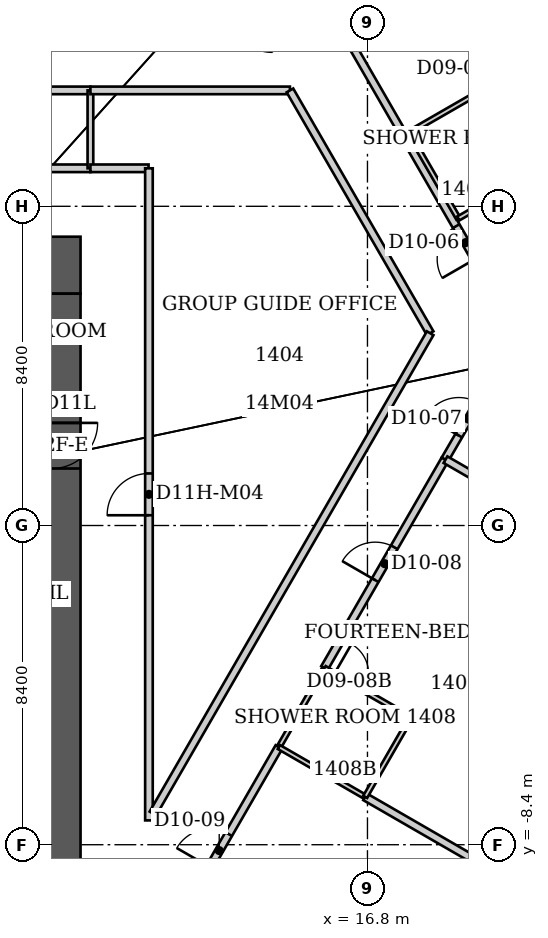
"""IFC4 building model, lengths in metres.
Left out: names, types, materials, properties, quantities, classifications, styles, units other than length and angle.
Written with IfcOpenShell. Run it as: python <this file> out.ifc"""

import sys

from ifc_helpers import new_model, si_unit, direction, frame, frame_2d, origin, origin_2d, place, context, subcontext, project, spatial, rectangle, extrude, element, fill, save


model = new_model("IFC4")
c1 = context("Model", 3, precision=1e-05, world=origin(), true_north=direction((0.0, 1.0)))
c2 = subcontext(c1, "Body", "Model", "MODEL_VIEW")
j1 = project(units=[si_unit("LENGTHUNIT", "METRE"), si_unit("PLANEANGLEUNIT", "RADIAN")], contexts=[c1])
p1 = place(None, origin())
s1 = spatial("IfcSite", under=j1, at=p1, CompositionType="ELEMENT")
p2 = place(p1, origin())
s2 = spatial("IfcBuilding", under=s1, at=p2, CompositionType="ELEMENT")
p3 = place(p2, frame((0.0, 0.0, 61.0)))
s3 = spatial("IfcBuildingStorey", under=s2, at=p3, CompositionType="ELEMENT", Elevation=61.0)
p4 = place(p3, frame((20.573, -9.462, 0.0), z_axis=(-0.033513958168, 0.015408716399, 0.999319461467), x_axis=(0.865447927191, -0.499650776395, 0.03672855794)))
e1 = element("IfcColumn", 1, at=p4, inside=s3, PredefinedType="COLUMN", context=c2, shape_type="SweptSolid", body=[
    extrude(rectangle(XDim=2.4, YDim=2.4, at=origin_2d()), origin(), (0.0, 0.0, 1.0), 3.803),
])
p5 = place(p3, frame((-9.25, 6.85, 0.0), z_axis=(0.0, 0.0, 1.0), x_axis=(1.0, 0.0, 0.0)))
e2 = element("IfcWall", 2, at=p5, inside=s3, PredefinedType="SHEAR", context=c2, shape_type="SweptSolid", body=[
    extrude(rectangle(XDim=18.5, YDim=1.5, at=frame_2d((9.25, 0.0))), origin(), (0.0, 0.0, 1.0), 3.8),
])
p6 = place(p3, frame((8.5, -9.2, 0.0), z_axis=(0.0, 0.0, 1.0), x_axis=(0.0, 1.0, 0.0)))
e3 = element("IfcWall", 3, at=p6, inside=s3, PredefinedType="SHEAR", context=c2, shape_type="SweptSolid", body=[
    extrude(rectangle(XDim=15.3, YDim=1.5, at=frame_2d((7.65, 0.0))), origin(), (0.0, 0.0, 1.0), 3.8),
])
p7 = place(p6, frame((10.7, 0.0, 0.0)))
e4 = element("IfcOpeningElement", 4, at=p7, cuts=e3, PredefinedType="OPENING", context=c2, shape_type="SweptSolid", body=[
    extrude(rectangle(XDim=1.2, YDim=2.2, at=frame_2d((0.6, 1.1))), frame((0.0, 0.75, 0.0), z_axis=(0.0, -1.0, 0.0), x_axis=(1.0, 0.0, 0.0)), (0.0, 0.0, 1.0), 1.5),
])
p8 = place(p3, frame((0.58, 11.45, 0.0), z_axis=(0.0, 0.0, 1.0), x_axis=(1.0, 0.0, 0.0)))
e5 = element("IfcWall", 5, at=p8, inside=s3, PredefinedType="PARTITIONING", context=c2, shape_type="SweptSolid", body=[
    extrude(rectangle(XDim=8.93, YDim=0.2, at=frame_2d((4.465, 0.0))), origin(), (0.0, 0.0, 1.0), 3.64),
])
p9 = place(p8, frame((3.915, 0.0, 0.0)))
e6 = element("IfcOpeningElement", 6, at=p9, cuts=e5, PredefinedType="OPENING", context=c2, shape_type="SweptSolid", body=[
    extrude(rectangle(XDim=1.1, YDim=2.2, at=frame_2d((0.55, 1.1))), frame((0.0, 0.1, 0.0), z_axis=(0.0, -1.0, 0.0), x_axis=(1.0, 0.0, 0.0)), (0.0, 0.0, 1.0), 0.2),
])
p10 = place(p3, frame((9.51, 9.4, 0.0), z_axis=(0.0, 0.0, 1.0), x_axis=(-1.0, 0.0, 0.0)))
e7 = element("IfcWall", 7, at=p10, inside=s3, PredefinedType="PARTITIONING", context=c2, shape_type="SweptSolid", body=[
    extrude(rectangle(XDim=8.93, YDim=0.2, at=frame_2d((4.465, 0.0))), origin(), (0.0, 0.0, 1.0), 3.64),
])
p11 = place(p3, frame((9.51, 11.45, 0.0), z_axis=(0.0, 0.0, 1.0), x_axis=(0.0, -1.0, 0.0)))
e8 = element("IfcWall", 8, at=p11, inside=s3, PredefinedType="PARTITIONING", context=c2, shape_type="SweptSolid", body=[
    extrude(rectangle(XDim=2.05, YDim=0.15, at=frame_2d((1.025, 0.0))), origin(), (0.0, 0.0, 1.0), 3.64),
])
p12 = place(p3, frame((9.51, 11.45, 0.0), z_axis=(0.0, 0.0, 1.0), x_axis=(1.0, 0.0, 0.0)))
e9 = element("IfcWall", 9, at=p12, inside=s3, PredefinedType="PARTITIONING", context=c2, shape_type="SweptSolid", body=[
    extrude(rectangle(XDim=5.25, YDim=0.2, at=frame_2d((2.625, 0.0))), origin(), (0.0, 0.0, 1.0), 3.64),
])
p13 = place(p3, frame((11.04, 9.4, 0.0), z_axis=(0.0, 0.0, 1.0), x_axis=(-1.0, 0.0, 0.0)))
e10 = element("IfcWall", 10, at=p13, inside=s3, PredefinedType="PARTITIONING", context=c2, shape_type="SweptSolid", body=[
    extrude(rectangle(XDim=1.53, YDim=0.2, at=frame_2d((0.765, 0.0))), origin(), (0.0, 0.0, 1.0), 3.64),
])
p14 = place(p3, frame((11.05, -7.76, 0.0), z_axis=(0.0, 0.0, 1.0), x_axis=(0.0, 1.0, 0.0)))
e11 = element("IfcWall", 11, at=p14, inside=s3, PredefinedType="PARTITIONING", context=c2, shape_type="SweptSolid", body=[
    extrude(rectangle(XDim=17.16, YDim=0.2, at=frame_2d((8.58, 0.0))), origin(), (0.0, 0.0, 1.0), 3.64),
])
p15 = place(p14, frame((8.03, 0.0, 0.0)))
e12 = element("IfcOpeningElement", 12, at=p15, cuts=e11, PredefinedType="OPENING", context=c2, shape_type="SweptSolid", body=[
    extrude(rectangle(XDim=1.1, YDim=2.2, at=frame_2d((0.55, 1.1))), frame((0.0, 0.1, 0.0), z_axis=(0.0, -1.0, 0.0), x_axis=(1.0, 0.0, 0.0)), (0.0, 0.0, 1.0), 0.2),
])
p16 = place(p3, frame((11.328, -11.279, 0.0), z_axis=(0.0, 0.0, 1.0), x_axis=(0.499554430625, 0.866282500598, 0.0)))
e13 = element("IfcWall", 13, at=p16, inside=s3, PredefinedType="PARTITIONING", context=c2, shape_type="SweptSolid", body=[
    extrude(rectangle(XDim=6.29, YDim=0.2, at=frame_2d((3.145, 0.0))), origin(), (0.0, 0.0, 1.0), 3.64),
])
p17 = place(p16, frame((2.645, 0.0, 0.0)))
e14 = element("IfcOpeningElement", 14, at=p17, cuts=e13, PredefinedType="OPENING", context=c2, shape_type="SweptSolid", body=[
    extrude(rectangle(XDim=1.0, YDim=2.13, at=frame_2d((0.5, 1.065))), frame((0.0, 0.1, 0.0), z_axis=(0.0, -1.0, 0.0), x_axis=(1.0, 0.0, 0.0)), (0.0, 0.0, 1.0), 0.2),
])
p18 = place(p3, frame((14.47, -5.83, 0.0), z_axis=(0.0, 0.0, 1.0), x_axis=(0.499693115345, 0.866202511239, 0.0)))
e15 = element("IfcWall", 15, at=p18, inside=s3, PredefinedType="PARTITIONING", context=c2, shape_type="SweptSolid", body=[
    extrude(rectangle(XDim=2.401, YDim=0.12, at=frame_2d((1.201, 0.0))), origin(), (0.0, 0.0, 1.0), 3.64),
])
p19 = place(p3, frame((14.47, -5.83, 0.0), z_axis=(0.0, 0.0, 1.0), x_axis=(0.866010296064, -0.500026166427, 0.0)))
e16 = element("IfcWall", 16, at=p19, inside=s3, PredefinedType="PARTITIONING", context=c2, shape_type="SweptSolid", body=[
    extrude(rectangle(XDim=2.621, YDim=0.12, at=frame_2d((1.311, 0.0))), origin(), (0.0, 0.0, 1.0), 3.023),
])
p20 = place(p3, frame((14.76, 11.45, 0.0), z_axis=(0.0, 0.0, 1.0), x_axis=(0.500074726567, -0.865982256082, 0.0)))
e17 = element("IfcWall", 17, at=p20, inside=s3, PredefinedType="PARTITIONING", context=c2, shape_type="SweptSolid", body=[
    extrude(rectangle(XDim=7.379, YDim=0.2, at=frame_2d((3.689, 0.0))), origin(), (0.0, 0.0, 1.0), 3.64),
])
p21 = place(p3, frame((15.67, -3.75, 0.0), z_axis=(0.0, 0.0, 1.0), x_axis=(0.500061360627, 0.865989974311, 0.0)))
e18 = element("IfcWall", 18, at=p21, inside=s3, PredefinedType="PARTITIONING", context=c2, shape_type="SweptSolid", body=[
    extrude(rectangle(XDim=6.34, YDim=0.2, at=frame_2d((3.17, 0.0))), origin(), (0.0, 0.0, 1.0), 3.64),
])
p22 = place(p21, frame((2.67, 0.0, 0.0)))
e19 = element("IfcOpeningElement", 19, at=p22, cuts=e18, PredefinedType="OPENING", context=c2, shape_type="SweptSolid", body=[
    extrude(rectangle(XDim=1.0, YDim=2.13, at=frame_2d((0.5, 1.065))), frame((0.0, 0.1, 0.0), z_axis=(0.0, -1.0, 0.0), x_axis=(1.0, 0.0, 0.0)), (0.0, 0.0, 1.0), 0.2),
])
p23 = place(p3, frame((15.92, 13.45, 0.0), z_axis=(0.0, 0.0, 1.0), x_axis=(0.499668886391, -0.866216487937, 0.0)))
e20 = element("IfcWall", 20, at=p23, inside=s3, PredefinedType="PARTITIONING", context=c2, shape_type="SweptSolid", body=[
    extrude(rectangle(XDim=3.683, YDim=0.2, at=frame_2d((1.841, 0.0))), origin(), (0.0, 0.0, 1.0), 3.64),
])
p24 = place(p3, frame((16.74, -7.141, 0.0), z_axis=(0.0, 0.0, 1.0), x_axis=(0.865985044037, -0.500069898618, 0.0)))
e21 = element("IfcWall", 21, at=p24, inside=s3, PredefinedType="PARTITIONING", context=c2, shape_type="SweptSolid", body=[
    extrude(rectangle(XDim=5.758, YDim=0.2, at=frame_2d((2.879, 0.0))), origin(), (0.0, 0.0, 1.0), 3.023),
])
p25 = place(p3, frame((16.74, -7.14, 0.0), z_axis=(0.0, 0.0, 1.0), x_axis=(0.499737123639, 0.866177122335, 0.0)))
e22 = element("IfcWall", 22, at=p25, inside=s3, PredefinedType="PARTITIONING", context=c2, shape_type="SweptSolid", body=[
    extrude(rectangle(XDim=2.401, YDim=0.12, at=frame_2d((1.201, 0.0))), origin(), (0.0, 0.0, 1.0), 3.64),
])
p26 = place(p3, frame((17.76, 10.26, 0.0), z_axis=(0.0, 0.0, 1.0), x_axis=(0.499725974117, -0.866183554908, 0.0)))
e23 = element("IfcWall", 23, at=p26, inside=s3, PredefinedType="PARTITIONING", context=c2, shape_type="SweptSolid", body=[
    extrude(rectangle(XDim=6.003, YDim=0.2, at=frame_2d((3.001, 0.0))), origin(), (0.0, 0.0, 1.0), 3.64),
])
p27 = place(p26, frame((2.75, 0.0, 0.0)))
e24 = element("IfcOpeningElement", 24, at=p27, cuts=e23, PredefinedType="OPENING", context=c2, shape_type="SweptSolid", body=[
    extrude(rectangle(XDim=1.0, YDim=2.13, at=frame_2d((0.5, 1.065))), frame((0.0, 0.1, 0.0), z_axis=(0.0, -1.0, 0.0), x_axis=(1.0, 0.0, 0.0)), (0.0, 0.0, 1.0), 0.2),
])
p28 = place(p3, frame((17.773, 10.268, 0.0), z_axis=(0.0, 0.0, 1.0), x_axis=(0.867562218799, 0.497328660458, 0.0)))
e25 = element("IfcWall", 25, at=p28, inside=s3, PredefinedType="PARTITIONING", context=c2, shape_type="SweptSolid", body=[
    extrude(rectangle(XDim=0.133, YDim=0.2, at=frame_2d((0.066, 0.0))), origin(), (0.0, 0.0, 1.0), 3.64),
])
p29 = place(p3, frame((17.888, 10.333, 0.0), z_axis=(0.0, 0.0, 1.0), x_axis=(0.866473201492, 0.499223588281, 0.0)))
e26 = element("IfcWall", 26, at=p29, inside=s3, PredefinedType="PARTITIONING", context=c2, shape_type="SweptSolid", body=[
    extrude(rectangle(XDim=2.401, YDim=0.12, at=frame_2d((1.201, 0.0))), origin(), (0.0, 0.0, 1.0), 2.86),
])
p30 = place(p3, frame((17.89, 10.33, 0.0), z_axis=(0.0, 0.0, 1.0), x_axis=(0.500291685314, -0.865856933682, 0.0)))
e27 = element("IfcWall", 27, at=p30, inside=s3, PredefinedType="PARTITIONING", context=c2, shape_type="SweptSolid", body=[
    extrude(rectangle(XDim=2.599, YDim=0.12, at=frame_2d((1.299, 0.0))), origin(), (0.0, 0.0, 1.0), 3.64),
])
p31 = place(p3, frame((17.94, -5.06, 0.0), z_axis=(0.0, 0.0, 1.0), x_axis=(-0.866114241029, 0.499846097802, 0.0)))
e28 = element("IfcWall", 28, at=p31, inside=s3, PredefinedType="PARTITIONING", context=c2, shape_type="SweptSolid", body=[
    extrude(rectangle(XDim=2.621, YDim=0.12, at=frame_2d((1.311, 0.0))), origin(), (0.0, 0.0, 1.0), 3.64),
])
p32 = place(p31, frame((1.421, 0.0, 0.0)))
e29 = element("IfcOpeningElement", 29, at=p32, cuts=e28, PredefinedType="OPENING", context=c2, shape_type="SweptSolid", body=[
    extrude(rectangle(XDim=0.9, YDim=2.03, at=frame_2d((0.45, 1.015))), frame((0.0, 0.06, 0.0), z_axis=(0.0, -1.0, 0.0), x_axis=(1.0, 0.0, 0.0)), (0.0, 0.0, 1.0), 0.12),
])
p33 = place(p3, frame((18.45, 5.06, 0.0), z_axis=(0.0, 0.0, 1.0), x_axis=(-0.499910730718, -0.866076937294, 0.0)))
e30 = element("IfcWall", 30, at=p33, inside=s3, PredefinedType="PARTITIONING", context=c2, shape_type="SweptSolid", body=[
    extrude(rectangle(XDim=14.593, YDim=0.2, at=frame_2d((7.296, 0.0))), origin(), (0.0, 0.0, 1.0), 3.64),
])
p34 = place(p3, frame((18.84, 1.74, 0.0), z_axis=(0.0, 0.0, 1.0), x_axis=(0.501813488763, 0.864975850817, 0.0)))
e31 = element("IfcWall", 31, at=p34, inside=s3, PredefinedType="PARTITIONING", context=c2, shape_type="SweptSolid", body=[
    extrude(rectangle(XDim=2.451, YDim=0.2, at=frame_2d((1.226, 0.0))), origin(), (0.0, 0.0, 1.0), 3.64),
])
p35 = place(p34, frame((0.726, 0.0, 0.0)))
e32 = element("IfcOpeningElement", 32, at=p35, cuts=e31, PredefinedType="OPENING", context=c2, shape_type="SweptSolid", body=[
    extrude(rectangle(XDim=1.0, YDim=2.13, at=frame_2d((0.5, 1.065))), frame((0.0, 0.1, 0.0), z_axis=(0.0, -1.0, 0.0), x_axis=(1.0, 0.0, 0.0)), (0.0, 0.0, 1.0), 0.2),
])
p36 = place(p3, frame((19.19, 8.08, 0.0), z_axis=(0.0, 0.0, 1.0), x_axis=(0.866202511239, 0.499693115345, 0.0)))
e33 = element("IfcWall", 33, at=p36, inside=s3, PredefinedType="PARTITIONING", context=c2, shape_type="SweptSolid", body=[
    extrude(rectangle(XDim=2.401, YDim=0.12, at=frame_2d((1.201, 0.0))), origin(), (0.0, 0.0, 1.0), 3.64),
])
p37 = place(p3, frame((26.096, -2.45, 0.0), z_axis=(0.0, 0.0, 1.0), x_axis=(-0.865997946826, 0.500047553832, 0.0)))
e34 = element("IfcWall", 34, at=p37, inside=s3, PredefinedType="PARTITIONING", context=c2, shape_type="SweptSolid", body=[
    extrude(rectangle(XDim=8.364, YDim=0.2, at=frame_2d((4.182, 0.0))), origin(), (0.0, 0.0, 1.0), 3.64),
])
p38 = place(p27, origin())
e35 = element("IfcDoor", 35, at=p38, inside=s3, OperationType="SINGLE_SWING_RIGHT", PredefinedType="DOOR", context=c2, shape_type="SweptSolid", body=[
    extrude(rectangle(XDim=1.0, YDim=2.13, at=frame_2d((0.5, 1.065))), frame((0.0, 0.025, 0.0), z_axis=(0.0, -1.0, 0.0), x_axis=(1.0, 0.0, 0.0)), (0.0, 0.0, 1.0), 0.05),
])
fill(e24, e35)
p39 = place(p35, origin())
e36 = element("IfcDoor", 36, at=p39, inside=s3, OperationType="SINGLE_SWING_LEFT", PredefinedType="DOOR", context=c2, shape_type="SweptSolid", body=[
    extrude(rectangle(XDim=1.0, YDim=2.13, at=frame_2d((0.5, 1.065))), frame((0.0, 0.025, 0.0), z_axis=(0.0, -1.0, 0.0), x_axis=(1.0, 0.0, 0.0)), (0.0, 0.0, 1.0), 0.05),
])
fill(e32, e36)
p40 = place(p22, origin())
e37 = element("IfcDoor", 37, at=p40, inside=s3, OperationType="SINGLE_SWING_LEFT", PredefinedType="DOOR", context=c2, shape_type="SweptSolid", body=[
    extrude(rectangle(XDim=1.0, YDim=2.13, at=frame_2d((0.5, 1.065))), frame((0.0, 0.025, 0.0), z_axis=(0.0, -1.0, 0.0), x_axis=(1.0, 0.0, 0.0)), (0.0, 0.0, 1.0), 0.05),
])
fill(e19, e37)
p41 = place(p32, origin())
e38 = element("IfcDoor", 38, at=p41, inside=s3, OperationType="SINGLE_SWING_RIGHT", PredefinedType="DOOR", context=c2, shape_type="SweptSolid", body=[
    extrude(rectangle(XDim=0.9, YDim=2.03, at=frame_2d((0.45, 1.015))), frame((0.0, 0.025, 0.0), z_axis=(0.0, -1.0, 0.0), x_axis=(1.0, 0.0, 0.0)), (0.0, 0.0, 1.0), 0.05),
])
fill(e29, e38)
p42 = place(p17, origin())
e39 = element("IfcDoor", 39, at=p42, inside=s3, OperationType="SINGLE_SWING_LEFT", PredefinedType="DOOR", context=c2, shape_type="SweptSolid", body=[
    extrude(rectangle(XDim=1.0, YDim=2.13, at=frame_2d((0.5, 1.065))), frame((0.0, 0.025, 0.0), z_axis=(0.0, -1.0, 0.0), x_axis=(1.0, 0.0, 0.0)), (0.0, 0.0, 1.0), 0.05),
])
fill(e14, e39)
p43 = place(p15, origin())
e40 = element("IfcDoor", 40, at=p43, inside=s3, OperationType="SINGLE_SWING_LEFT", PredefinedType="DOOR", context=c2, shape_type="SweptSolid", body=[
    extrude(rectangle(XDim=1.1, YDim=2.2, at=frame_2d((0.55, 1.1))), frame((0.0, 0.025, 0.0), z_axis=(0.0, -1.0, 0.0), x_axis=(1.0, 0.0, 0.0)), (0.0, 0.0, 1.0), 0.05),
])
fill(e12, e40)
p44 = place(p7, origin())
e41 = element("IfcDoor", 41, at=p44, inside=s3, OperationType="SINGLE_SWING_RIGHT", PredefinedType="DOOR", context=c2, shape_type="SweptSolid", body=[
    extrude(rectangle(XDim=1.2, YDim=2.2, at=frame_2d((0.6, 1.1))), frame((0.0, 0.025, 0.0), z_axis=(0.0, -1.0, 0.0), x_axis=(1.0, 0.0, 0.0)), (0.0, 0.0, 1.0), 0.05),
])
fill(e4, e41)
save(model, sys.argv[1])
